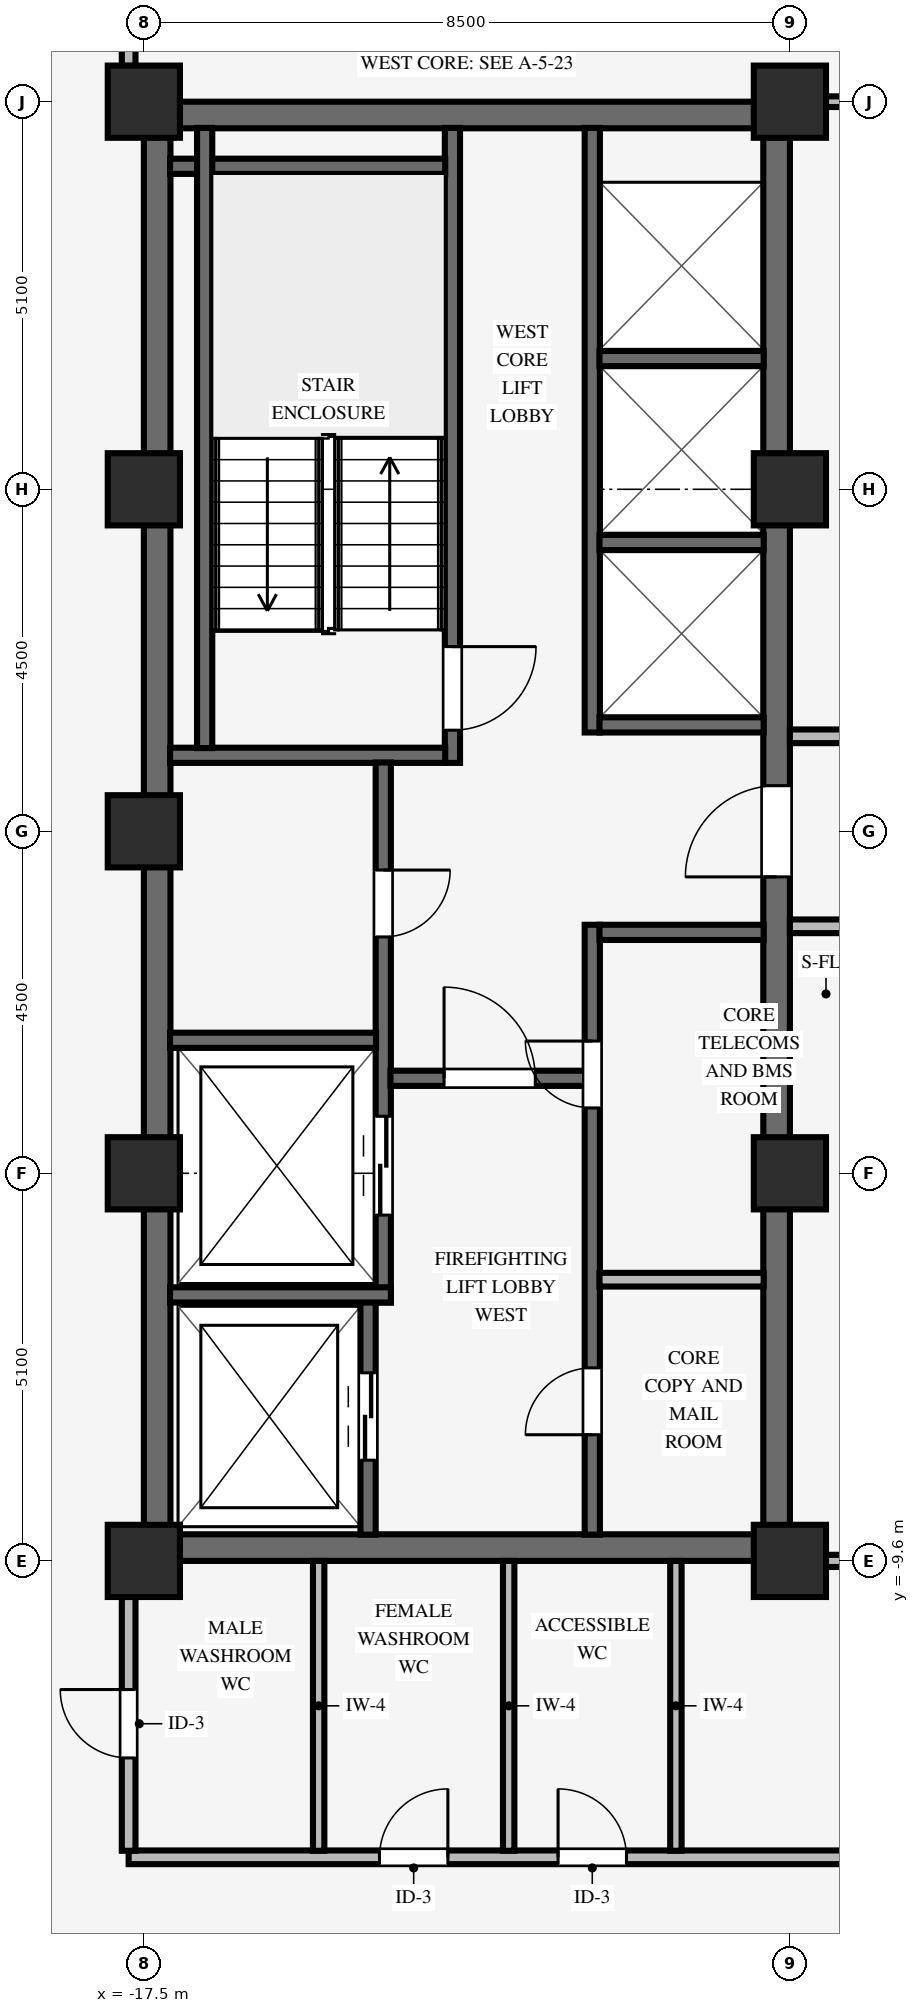
"""IFC4 building model, lengths in metres.
Left out: names, types, materials, properties, quantities, classifications, styles, units other than length and angle.
Written with IfcOpenShell. Run it as: python <this file> out.ifc"""

import sys

from ifc_helpers import new_model, si_unit, direction, frame, frame_2d, origin, origin_2d, place, context, subcontext, project, spatial, rectangle, extrude, source, transform, mapped, element, fill, save


model = new_model("IFC4")
c1 = context("Model", 3, precision=1e-05, world=origin(), true_north=direction((0.0, 1.0)))
c2 = subcontext(c1, "Body", "Model", "MODEL_VIEW")
j1 = project(units=[si_unit("LENGTHUNIT", "METRE"), si_unit("PLANEANGLEUNIT", "RADIAN")], contexts=[c1])
p1 = place(None, origin())
s1 = spatial("IfcSite", under=j1, at=p1, CompositionType="ELEMENT")
p2 = place(p1, origin())
s2 = spatial("IfcBuilding", under=s1, at=p2, CompositionType="ELEMENT")
p3 = place(p2, frame((0.0, 0.0, 205.5)))
s3 = spatial("IfcBuildingStorey", under=s2, at=p3, CompositionType="ELEMENT", Elevation=205.5)
for number, where, z_axis, x_axis in (
    (1, (-17.5, -9.425, 0.0), (0.0, 0.0, 1.0), (1.0, 0.0, 0.0)),
    (2, (-17.5, 9.425, 0.0), (0.0, 0.0, 1.0), (1.0, 0.0, 0.0)),
):
    element("IfcWall", number, at=place(p3, frame(where, z_axis=z_axis, x_axis=x_axis)), inside=s3, PredefinedType="SHEAR", context=c2, shape_type="SweptSolid", body=[
        extrude(rectangle(XDim=8.5, YDim=0.35, at=frame_2d((4.25, 0.0))), origin(), (0.0, 0.0, 1.0), 3.25),
    ])
p4 = place(p3, frame((-17.325, -9.255, 0.0), z_axis=(0.0, 0.0, 1.0), x_axis=(0.0, 1.0, 0.0)))
e3 = element("IfcWall", 3, at=p4, inside=s3, PredefinedType="SHEAR", context=c2, shape_type="SweptSolid", body=[
    extrude(rectangle(XDim=18.51, YDim=0.35, at=frame_2d((9.255, 0.0))), origin(), (0.0, 0.0, 1.0), 3.25),
])
p5 = place(p3, frame((-9.175, -9.255, 0.0), z_axis=(0.0, 0.0, 1.0), x_axis=(0.0, 1.0, 0.0)))
e4 = element("IfcWall", 4, at=p5, inside=s3, PredefinedType="SHEAR", context=c2, shape_type="SweptSolid", body=[
    extrude(rectangle(XDim=18.51, YDim=0.35, at=frame_2d((9.255, 0.0))), origin(), (0.0, 0.0, 1.0), 3.25),
])
p6 = place(p5, frame((8.655, 0.0, 0.0)))
e5 = element("IfcOpeningElement", 5, at=p6, cuts=e4, PredefinedType="OPENING", context=c2, shape_type="SweptSolid", body=[
    extrude(rectangle(XDim=1.2, YDim=2.15, at=frame_2d((0.6, 1.075))), frame((0.0, 0.185, 0.0), z_axis=(0.0, -1.0, 0.0), x_axis=(1.0, 0.0, 0.0)), (0.0, 0.0, 1.0), 0.37),
])
for number, where, z_axis, x_axis in (
    (6, (-17.5, -9.6, 0.0), (0.0, 0.0, 1.0), (1.0, 0.0, 0.0)),
    (7, (-17.5, -4.5, 0.0), (0.0, 0.0, 1.0), (1.0, 0.0, 0.0)),
    (8, (-17.5, 4.5, 0.0), (0.0, 0.0, 1.0), (1.0, 0.0, 0.0)),
    (9, (-17.5, 9.6, 0.0), (0.0, 0.0, 1.0), (1.0, 0.0, 0.0)),
    (10, (-9.0, -9.6, 0.0), (0.0, 0.0, 1.0), (1.0, 0.0, 0.0)),
    (11, (-9.0, -4.5, 0.0), (0.0, 0.0, 1.0), (1.0, 0.0, 0.0)),
    (12, (-9.0, 4.5, 0.0), (0.0, 0.0, 1.0), (1.0, 0.0, 0.0)),
    (13, (-9.0, 9.6, 0.0), (0.0, 0.0, 1.0), (1.0, 0.0, 0.0)),
    (14, (-17.5, 0.0, 0.0), (0.0, 0.0, 1.0), (1.0, 0.0, 0.0)),
):
    element("IfcColumn", number, at=place(p3, frame(where, z_axis=z_axis, x_axis=x_axis)), inside=s3, PredefinedType="COLUMN", context=c2, shape_type="SweptSolid", body=[
        extrude(rectangle(XDim=0.95, YDim=0.95, at=origin_2d()), origin(), (0.0, 0.0, 1.0), 3.25),
    ])
p7 = place(p3, frame((-13.44, 0.9, 0.0), z_axis=(0.0, 0.0, 1.0), x_axis=(0.0, 1.0, 0.0)))
e15 = element("IfcWall", 15, at=p7, inside=s3, PredefinedType="SHEAR", context=c2, shape_type="SweptSolid", body=[
    extrude(rectangle(XDim=8.355, YDim=0.2, at=frame_2d((4.177, 0.0))), origin(), (0.0, 0.0, 1.0), 3.25),
])
p8 = place(p7, frame((1.53, 0.0, 0.0), z_axis=(0.0, 0.0, 1.0), x_axis=(-1.0, 0.0, 0.0)))
e16 = element("IfcOpeningElement", 16, at=p8, cuts=e15, PredefinedType="OPENING", context=c2, shape_type="SweptSolid", body=[
    extrude(rectangle(XDim=1.1, YDim=2.15, at=frame_2d((0.55, 1.075))), frame((0.0, 0.11, 0.0), z_axis=(0.0, -1.0, 0.0), x_axis=(1.0, 0.0, 0.0)), (0.0, 0.0, 1.0), 0.22),
])
for number, where, z_axis, x_axis in (
    (17, (-17.155, 1.0, 0.0), (0.0, 0.0, 1.0), (1.0, 0.0, 0.0)),
    (18, (-17.155, 8.75, 0.0), (0.0, 0.0, 1.0), (1.0, 0.0, 0.0)),
):
    element("IfcWall", number, at=place(p3, frame(where, z_axis=z_axis, x_axis=x_axis)), inside=s3, PredefinedType="SHEAR", context=c2, shape_type="SweptSolid", body=[
        extrude(rectangle(XDim=3.62, YDim=0.2, at=frame_2d((1.81, 0.0))), origin(), (0.0, 0.0, 1.0), 3.25),
    ])
p9 = place(p3, frame((-16.7, 1.095, 0.0), z_axis=(0.0, 0.0, 1.0), x_axis=(0.0, 1.0, 0.0)))
e19 = element("IfcWall", 19, at=p9, inside=s3, PredefinedType="SHEAR", context=c2, shape_type="SweptSolid", body=[
    extrude(rectangle(XDim=8.16, YDim=0.2, at=frame_2d((4.08, 0.0))), origin(), (0.0, 0.0, 1.0), 3.25),
])
p10 = place(p3, frame((-14.55, -9.255, 0.0), z_axis=(0.0, 0.0, 1.0), x_axis=(0.0, 1.0, 0.0)))
e20 = element("IfcWall", 20, at=p10, inside=s3, PredefinedType="SHEAR", context=c2, shape_type="SweptSolid", body=[
    extrude(rectangle(XDim=3.06, YDim=0.2, at=frame_2d((1.53, 0.0))), origin(), (0.0, 0.0, 1.0), 3.25),
])
p11 = place(p10, frame((0.98, 0.0, 0.0)))
e21 = element("IfcOpeningElement", 21, at=p11, cuts=e20, PredefinedType="OPENING", context=c2, shape_type="SweptSolid", body=[
    extrude(rectangle(XDim=1.15, YDim=2.15, at=frame_2d((0.575, 1.075))), frame((0.0, 0.11, 0.0), z_axis=(0.0, -1.0, 0.0), x_axis=(1.0, 0.0, 0.0)), (0.0, 0.0, 1.0), 0.22),
])
p12 = place(p3, frame((-14.35, -6.2, 0.0), z_axis=(0.0, 0.0, 1.0), x_axis=(0.0, 1.0, 0.0)))
e22 = element("IfcWall", 22, at=p12, inside=s3, PredefinedType="SHEAR", context=c2, shape_type="SweptSolid", body=[
    extrude(rectangle(XDim=7.105, YDim=0.2, at=frame_2d((3.552, 0.0))), origin(), (0.0, 0.0, 1.0), 3.25),
])
p13 = place(p12, frame((5.69, 0.0, 0.0), z_axis=(0.0, 0.0, 1.0), x_axis=(-1.0, 0.0, 0.0)))
e23 = element("IfcOpeningElement", 23, at=p13, cuts=e22, PredefinedType="OPENING", context=c2, shape_type="SweptSolid", body=[
    extrude(rectangle(XDim=0.88, YDim=2.1, at=frame_2d((0.44, 1.05))), frame((0.0, 0.11, 0.0), z_axis=(0.0, -1.0, 0.0), x_axis=(1.0, 0.0, 0.0)), (0.0, 0.0, 1.0), 0.22),
])
p14 = place(p12, frame((1.15, 0.0, 0.0)))
e24 = element("IfcOpeningElement", 24, at=p14, cuts=e22, PredefinedType="OPENING", context=c2, shape_type="SweptSolid", body=[
    extrude(rectangle(XDim=1.3, YDim=2.2, at=frame_2d((0.65, 1.1))), frame((0.0, 0.11, 0.0), z_axis=(0.0, -1.0, 0.0), x_axis=(1.0, 0.0, 0.0)), (0.0, 0.0, 1.0), 0.22),
])
p15 = place(p3, frame((-17.155, -6.1, 0.0), z_axis=(0.0, 0.0, 1.0), x_axis=(1.0, 0.0, 0.0)))
e25 = element("IfcWall", 25, at=p15, inside=s3, PredefinedType="SHEAR", context=c2, shape_type="SweptSolid", body=[
    extrude(rectangle(XDim=2.905, YDim=0.2, at=frame_2d((1.453, 0.0))), origin(), (0.0, 0.0, 1.0), 3.25),
])
p16 = place(p3, frame((-17.155, -2.75, 0.0), z_axis=(0.0, 0.0, 1.0), x_axis=(1.0, 0.0, 0.0)))
e26 = element("IfcWall", 26, at=p16, inside=s3, PredefinedType="SHEAR", context=c2, shape_type="SweptSolid", body=[
    extrude(rectangle(XDim=2.71, YDim=0.2, at=frame_2d((1.355, 0.0))), origin(), (0.0, 0.0, 1.0), 3.25),
])
p17 = place(p3, frame((-11.6, -9.255, 0.0), z_axis=(0.0, 0.0, 1.0), x_axis=(0.0, 1.0, 0.0)))
e27 = element("IfcWall", 27, at=p17, inside=s3, PredefinedType="SHEAR", context=c2, shape_type="SweptSolid", body=[
    extrude(rectangle(XDim=8.025, YDim=0.2, at=frame_2d((4.012, 0.0))), origin(), (0.0, 0.0, 1.0), 3.25),
])
p18 = place(p17, frame((1.315, 0.0, 0.0)))
e28 = element("IfcOpeningElement", 28, at=p18, cuts=e27, PredefinedType="OPENING", context=c2, shape_type="SweptSolid", body=[
    extrude(rectangle(XDim=0.88, YDim=2.1, at=frame_2d((0.44, 1.05))), frame((0.0, 0.11, 0.0), z_axis=(0.0, -1.0, 0.0), x_axis=(1.0, 0.0, 0.0)), (0.0, 0.0, 1.0), 0.22),
])
p19 = place(p17, frame((5.615, 0.0, 0.0)))
e29 = element("IfcOpeningElement", 29, at=p19, cuts=e27, PredefinedType="OPENING", context=c2, shape_type="SweptSolid", body=[
    extrude(rectangle(XDim=0.88, YDim=2.1, at=frame_2d((0.44, 1.05))), frame((0.0, 0.11, 0.0), z_axis=(0.0, -1.0, 0.0), x_axis=(1.0, 0.0, 0.0)), (0.0, 0.0, 1.0), 0.22),
])
p20 = place(p3, frame((-14.255, -3.25, 0.0), z_axis=(0.0, 0.0, 1.0), x_axis=(1.0, 0.0, 0.0)))
e30 = element("IfcWall", 30, at=p20, inside=s3, PredefinedType="SHEAR", context=c2, shape_type="SweptSolid", body=[
    extrude(rectangle(XDim=2.56, YDim=0.2, at=frame_2d((1.28, 0.0))), origin(), (0.0, 0.0, 1.0), 3.25),
])
p21 = place(p20, frame((0.705, 0.0, 0.0)))
e31 = element("IfcOpeningElement", 31, at=p21, cuts=e30, PredefinedType="OPENING", context=c2, shape_type="SweptSolid", body=[
    extrude(rectangle(XDim=1.2, YDim=2.15, at=frame_2d((0.6, 1.075))), frame((0.0, 0.11, 0.0), z_axis=(0.0, -1.0, 0.0), x_axis=(1.0, 0.0, 0.0)), (0.0, 0.0, 1.0), 0.22),
])
p22 = place(p3, frame((-11.505, -1.33, 0.0), z_axis=(0.0, 0.0, 1.0), x_axis=(1.0, 0.0, 0.0)))
e32 = element("IfcWall", 32, at=p22, inside=s3, PredefinedType="SHEAR", context=c2, shape_type="SweptSolid", body=[
    extrude(rectangle(XDim=2.16, YDim=0.2, at=frame_2d((1.08, 0.0))), origin(), (0.0, 0.0, 1.0), 3.25),
])
p23 = place(p3, frame((-11.505, -5.9, 0.0), z_axis=(0.0, 0.0, 1.0), x_axis=(1.0, 0.0, 0.0)))
e33 = element("IfcWall", 33, at=p23, inside=s3, PredefinedType="PARTITIONING", context=c2, shape_type="SweptSolid", body=[
    extrude(rectangle(XDim=2.16, YDim=0.18, at=frame_2d((1.08, 0.0))), origin(), (0.0, 0.0, 1.0), 3.24),
])
p24 = place(p3, frame((-11.6, 1.3, 0.0), z_axis=(0.0, 0.0, 1.0), x_axis=(0.0, 1.0, 0.0)))
e34 = element("IfcWall", 34, at=p24, inside=s3, PredefinedType="SHEAR", context=c2, shape_type="SweptSolid", body=[
    extrude(rectangle(XDim=7.955, YDim=0.2, at=frame_2d((3.978, 0.0))), origin(), (0.0, 0.0, 1.0), 3.25),
])
for number, where, z_axis, x_axis in (
    (35, (-11.505, 1.4, 0.0), (0.0, 0.0, 1.0), (1.0, 0.0, 0.0)),
    (36, (-11.505, 3.8, 0.0), (0.0, 0.0, 1.0), (1.0, 0.0, 0.0)),
    (37, (-11.505, 6.22, 0.0), (0.0, 0.0, 1.0), (1.0, 0.0, 0.0)),
):
    element("IfcWall", number, at=place(p3, frame(where, z_axis=z_axis, x_axis=x_axis)), inside=s3, PredefinedType="SHEAR", context=c2, shape_type="SweptSolid", body=[
        extrude(rectangle(XDim=2.16, YDim=0.2, at=frame_2d((1.08, 0.0))), origin(), (0.0, 0.0, 1.0), 3.25),
    ])
p25 = place(p3, frame((-17.7, -13.5, 0.0), z_axis=(0.0, 0.0, 1.0), x_axis=(1.0, 0.0, 0.0)))
e38 = element("IfcWall", 38, at=p25, inside=s3, PredefinedType="PARTITIONING", context=c2, shape_type="SweptSolid", body=[
    extrude(rectangle(XDim=24.3, YDim=0.18, at=frame_2d((12.15, 0.0))), origin(), (0.0, 0.0, 1.0), 2.888),
])
p26 = place(p25, frame((18.42, 0.0, 0.0)))
e39 = element("IfcOpeningElement", 39, at=p26, cuts=e38, PredefinedType="OPENING", context=c2, shape_type="SweptSolid", body=[
    extrude(rectangle(XDim=0.96, YDim=2.1, at=frame_2d((0.48, 1.05))), frame((0.0, 0.1, 0.0), z_axis=(0.0, -1.0, 0.0), x_axis=(1.0, 0.0, 0.0)), (0.0, 0.0, 1.0), 0.2),
])
p27 = place(p25, frame((9.87, 0.0, 0.0)))
e40 = element("IfcOpeningElement", 40, at=p27, cuts=e38, PredefinedType="OPENING", context=c2, shape_type="SweptSolid", body=[
    extrude(rectangle(XDim=0.96, YDim=2.1, at=frame_2d((0.48, 1.05))), frame((0.0, 0.1, 0.0), z_axis=(0.0, -1.0, 0.0), x_axis=(1.0, 0.0, 0.0)), (0.0, 0.0, 1.0), 0.2),
])
p28 = place(p25, frame((3.3, 0.0, 0.0)))
e41 = element("IfcOpeningElement", 41, at=p28, cuts=e38, PredefinedType="OPENING", context=c2, shape_type="SweptSolid", body=[
    extrude(rectangle(XDim=0.9, YDim=2.1, at=frame_2d((0.45, 1.05))), frame((0.0, 0.1, 0.0), z_axis=(0.0, -1.0, 0.0), x_axis=(1.0, 0.0, 0.0)), (0.0, 0.0, 1.0), 0.2),
])
p29 = place(p25, frame((5.65, 0.0, 0.0)))
e42 = element("IfcOpeningElement", 42, at=p29, cuts=e38, PredefinedType="OPENING", context=c2, shape_type="SweptSolid", body=[
    extrude(rectangle(XDim=0.9, YDim=2.1, at=frame_2d((0.45, 1.05))), frame((0.0, 0.1, 0.0), z_axis=(0.0, -1.0, 0.0), x_axis=(1.0, 0.0, 0.0)), (0.0, 0.0, 1.0), 0.2),
])
p30 = place(p3, frame((-8.529, -9.6, 0.0), z_axis=(0.0, 0.0, 1.0), x_axis=(1.0, 0.0, 0.0)))
e43 = element("IfcWall", 43, at=p30, inside=s3, PredefinedType="PARTITIONING", context=c2, shape_type="SweptSolid", body=[
    extrude(rectangle(XDim=8.378, YDim=0.16, at=frame_2d((4.189, 0.0))), origin(), (0.0, 0.0, 1.0), 2.285),
])
p31 = place(p3, frame((-9.0, -1.25, 0.0), z_axis=(0.0, 0.0, 1.0), x_axis=(1.0, 0.0, 0.0)))
e44 = element("IfcWall", 44, at=p31, inside=s3, PredefinedType="PARTITIONING", context=c2, shape_type="SweptSolid", body=[
    extrude(rectangle(XDim=15.6, YDim=0.18, at=frame_2d((7.8, 0.0))), origin(), (0.0, 0.0, 1.0), 3.24),
])
p32 = place(p31, frame((3.32, 0.0, 0.0)))
e45 = element("IfcOpeningElement", 45, at=p32, cuts=e44, PredefinedType="OPENING", context=c2, shape_type="SweptSolid", body=[
    extrude(rectangle(XDim=0.96, YDim=2.1, at=frame_2d((0.48, 1.05))), frame((0.0, 0.1, 0.0), z_axis=(0.0, -1.0, 0.0), x_axis=(1.0, 0.0, 0.0)), (0.0, 0.0, 1.0), 0.2),
])
p33 = place(p3, frame((-9.0, 1.25, 0.0), z_axis=(0.0, 0.0, 1.0), x_axis=(1.0, 0.0, 0.0)))
e46 = element("IfcWall", 46, at=p33, inside=s3, PredefinedType="PARTITIONING", context=c2, shape_type="SweptSolid", body=[
    extrude(rectangle(XDim=15.6, YDim=0.18, at=frame_2d((7.8, 0.0))), origin(), (0.0, 0.0, 1.0), 3.24),
])
p34 = place(p33, frame((7.32, 0.0, 0.0)))
e47 = element("IfcOpeningElement", 47, at=p34, cuts=e46, PredefinedType="OPENING", context=c2, shape_type="SweptSolid", body=[
    extrude(rectangle(XDim=0.96, YDim=2.1, at=frame_2d((0.48, 1.05))), frame((0.0, 0.1, 0.0), z_axis=(0.0, -1.0, 0.0), x_axis=(1.0, 0.0, 0.0)), (0.0, 0.0, 1.0), 0.2),
])
p35 = place(p3, frame((-8.529, 9.6, 0.0), z_axis=(0.0, 0.0, 1.0), x_axis=(1.0, 0.0, 0.0)))
e48 = element("IfcWall", 48, at=p35, inside=s3, PredefinedType="PARTITIONING", context=c2, shape_type="SweptSolid", body=[
    extrude(rectangle(XDim=8.378, YDim=0.14, at=frame_2d((4.189, 0.0))), origin(), (0.0, 0.0, 1.0), 2.285),
])
p36 = place(p3, frame((-17.7, -13.414, 0.0), z_axis=(0.0, 0.0, 1.0), x_axis=(0.0, 1.0, 0.0)))
e49 = element("IfcWall", 49, at=p36, inside=s3, PredefinedType="PARTITIONING", context=c2, shape_type="SweptSolid", body=[
    extrude(rectangle(XDim=3.343, YDim=0.18, at=frame_2d((1.671, 0.0))), origin(), (0.0, 0.0, 1.0), 2.696),
])
p37 = place(p36, frame((1.221, 0.0, 0.0)))
e50 = element("IfcOpeningElement", 50, at=p37, cuts=e49, PredefinedType="OPENING", context=c2, shape_type="SweptSolid", body=[
    extrude(rectangle(XDim=0.9, YDim=2.1, at=frame_2d((0.45, 1.05))), frame((0.0, 0.1, 0.0), z_axis=(0.0, -1.0, 0.0), x_axis=(1.0, 0.0, 0.0)), (0.0, 0.0, 1.0), 0.2),
])
p38 = place(p3, frame((-17.7, 10.071, 0.0), z_axis=(0.0, 0.0, 1.0), x_axis=(0.0, 1.0, 0.0)))
e51 = element("IfcWall", 51, at=p38, inside=s3, PredefinedType="PARTITIONING", context=c2, shape_type="SweptSolid", body=[
    extrude(rectangle(XDim=3.343, YDim=0.18, at=frame_2d((1.671, 0.0))), origin(), (0.0, 0.0, 1.0), 2.696),
])
for number, where, z_axis, x_axis in (
    (52, (-15.2, -13.414, 0.0), (0.0, 0.0, 1.0), (0.0, 1.0, 0.0)),
    (53, (-12.7, -13.414, 0.0), (0.0, 0.0, 1.0), (0.0, 1.0, 0.0)),
    (54, (-10.5, -13.414, 0.0), (0.0, 0.0, 1.0), (0.0, 1.0, 0.0)),
):
    element("IfcWall", number, at=place(p3, frame(where, z_axis=z_axis, x_axis=x_axis)), inside=s3, PredefinedType="PARTITIONING", context=c2, shape_type="SweptSolid", body=[
        extrude(rectangle(XDim=3.814, YDim=0.15, at=frame_2d((1.907, 0.0))), origin(), (0.0, 0.0, 1.0), 3.24),
    ])
m1 = source(origin(), c2, "Body", "SweptSolid", [
    extrude(rectangle(XDim=1.1, YDim=2.15, at=frame_2d((0.55, 1.075))), frame((0.0, 0.025, 0.0), z_axis=(0.0, -1.0, 0.0), x_axis=(1.0, 0.0, 0.0)), (0.0, 0.0, 1.0), 0.05),
])
p39 = place(p8, origin())
e55 = element("IfcDoor", 55, at=p39, inside=s3, OperationType="SINGLE_SWING_LEFT", PredefinedType="DOOR", context=c2, shape_type="MappedRepresentation", body=[
    mapped(m1, transform((0.0, 0.0, 0.0), scale=1.0)),
])
fill(e16, e55)
m2 = source(origin(), c2, "Body", "SweptSolid", [
    extrude(rectangle(XDim=0.88, YDim=2.1, at=frame_2d((0.44, 1.05))), frame((0.0, 0.025, 0.0), z_axis=(0.0, -1.0, 0.0), x_axis=(1.0, 0.0, 0.0)), (0.0, 0.0, 1.0), 0.05),
])
p40 = place(p13, origin())
e56 = element("IfcDoor", 56, at=p40, inside=s3, OperationType="SINGLE_SWING_LEFT", PredefinedType="DOOR", context=c2, shape_type="MappedRepresentation", body=[
    mapped(m2, transform((0.0, 0.0, 0.0), scale=1.0)),
])
fill(e23, e56)
m3 = source(origin(), c2, "Body", "SweptSolid", [
    extrude(rectangle(XDim=1.2, YDim=2.15, at=frame_2d((0.6, 1.075))), frame((0.0, 0.025, 0.0), z_axis=(0.0, -1.0, 0.0), x_axis=(1.0, 0.0, 0.0)), (0.0, 0.0, 1.0), 0.05),
])
p41 = place(p21, origin())
e57 = element("IfcDoor", 57, at=p41, inside=s3, OperationType="SINGLE_SWING_LEFT", PredefinedType="DOOR", context=c2, shape_type="MappedRepresentation", body=[
    mapped(m3, transform((0.0, 0.0, 0.0), scale=1.0)),
])
fill(e31, e57)
p42 = place(p18, origin())
e58 = element("IfcDoor", 58, at=p42, inside=s3, OperationType="SINGLE_SWING_LEFT", PredefinedType="DOOR", context=c2, shape_type="MappedRepresentation", body=[
    mapped(m2, transform((0.0, 0.0, 0.0), scale=1.0)),
])
fill(e28, e58)
p43 = place(p19, origin())
e59 = element("IfcDoor", 59, at=p43, inside=s3, OperationType="SINGLE_SWING_RIGHT", PredefinedType="DOOR", context=c2, shape_type="MappedRepresentation", body=[
    mapped(m2, transform((0.0, 0.0, 0.0), scale=1.0)),
])
fill(e29, e59)
p44 = place(p6, origin())
e60 = element("IfcDoor", 60, at=p44, inside=s3, OperationType="SINGLE_SWING_LEFT", PredefinedType="DOOR", context=c2, shape_type="MappedRepresentation", body=[
    mapped(m3, transform((0.0, 0.0, 0.0), scale=1.0)),
])
fill(e5, e60)
m4 = source(origin(), c2, "Body", "SweptSolid", [
    extrude(rectangle(XDim=1.15, YDim=2.15, at=frame_2d((0.575, 1.075))), frame((0.0, 0.025, 0.0), z_axis=(0.0, -1.0, 0.0), x_axis=(1.0, 0.0, 0.0)), (0.0, 0.0, 1.0), 0.05),
])
p45 = place(p11, origin())
e61 = element("IfcDoor", 61, at=p45, inside=s3, OperationType="DOUBLE_DOOR_SLIDING", PredefinedType="DOOR", context=c2, shape_type="MappedRepresentation", body=[
    mapped(m4, transform((0.0, 0.0, 0.0), scale=1.0)),
])
fill(e21, e61)
m5 = source(origin(), c2, "Body", "SweptSolid", [
    extrude(rectangle(XDim=1.3, YDim=2.2, at=frame_2d((0.65, 1.1))), frame((0.0, 0.025, 0.0), z_axis=(0.0, -1.0, 0.0), x_axis=(1.0, 0.0, 0.0)), (0.0, 0.0, 1.0), 0.05),
])
p46 = place(p14, origin())
e62 = element("IfcDoor", 62, at=p46, inside=s3, OperationType="DOUBLE_DOOR_SLIDING", PredefinedType="DOOR", context=c2, shape_type="MappedRepresentation", body=[
    mapped(m5, transform((0.0, 0.0, 0.0), scale=1.0)),
])
fill(e24, e62)
m6 = source(origin(), c2, "Body", "SweptSolid", [
    extrude(rectangle(XDim=0.9, YDim=2.1, at=frame_2d((0.45, 1.05))), frame((0.0, 0.025, 0.0), z_axis=(0.0, -1.0, 0.0), x_axis=(1.0, 0.0, 0.0)), (0.0, 0.0, 1.0), 0.05),
])
p47 = place(p37, origin())
e63 = element("IfcDoor", 63, at=p47, inside=s3, OperationType="SINGLE_SWING_RIGHT", PredefinedType="DOOR", context=c2, shape_type="MappedRepresentation", body=[
    mapped(m6, transform((0.0, 0.0, 0.0), scale=1.0)),
])
fill(e50, e63)
p48 = place(p28, origin())
e64 = element("IfcDoor", 64, at=p48, inside=s3, OperationType="SINGLE_SWING_RIGHT", PredefinedType="DOOR", context=c2, shape_type="MappedRepresentation", body=[
    mapped(m6, transform((0.0, 0.0, 0.0), scale=1.0)),
])
fill(e41, e64)
p49 = place(p29, origin())
e65 = element("IfcDoor", 65, at=p49, inside=s3, OperationType="SINGLE_SWING_LEFT", PredefinedType="DOOR", context=c2, shape_type="MappedRepresentation", body=[
    mapped(m6, transform((0.0, 0.0, 0.0), scale=1.0)),
])
fill(e42, e65)
save(model, sys.argv[1])
